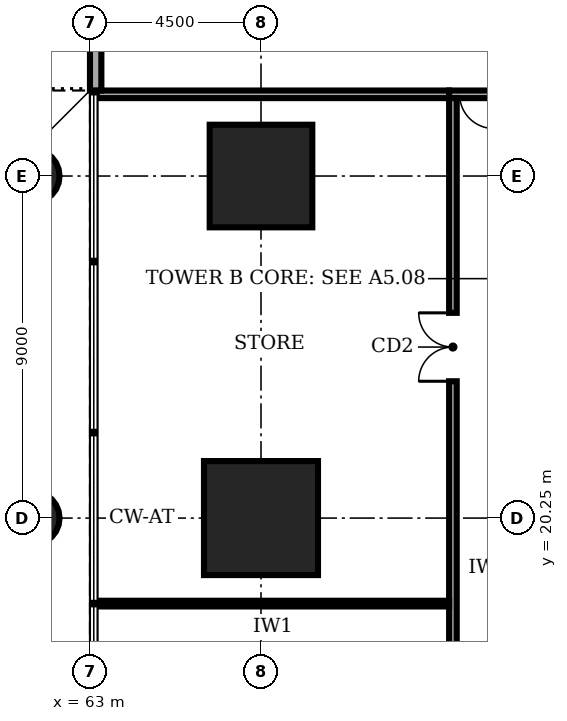
"""IFC4 building model, lengths in metres.
Left out: names, types, materials, properties, quantities, classifications, styles, units other than length and angle.
Written with IfcOpenShell. Run it as: python <this file> out.ifc"""

import sys

from ifc_helpers import new_model, si_unit, direction, frame, frame_2d, origin, origin_2d, place, context, subcontext, project, spatial, rectangle, circle, extrude, element, fill, save


model = new_model("IFC4")
c1 = context("Model", 3, precision=1e-05, world=origin(), true_north=direction((0.0, 1.0)))
c2 = subcontext(c1, "Body", "Model", "MODEL_VIEW")
j1 = project(units=[si_unit("LENGTHUNIT", "METRE"), si_unit("PLANEANGLEUNIT", "RADIAN")], contexts=[c1])
p1 = place(None, origin())
s1 = spatial("IfcSite", under=j1, at=p1, CompositionType="ELEMENT")
p2 = place(p1, origin())
s2 = spatial("IfcBuilding", under=s1, at=p2, CompositionType="ELEMENT")
p3 = place(p2, frame((0.0, 0.0, 16.0)))
s3 = spatial("IfcBuildingStorey", under=s2, at=p3, CompositionType="ELEMENT", Elevation=16.0)
p4 = place(p3, frame((67.5, 20.25, 0.0), z_axis=(0.0, 0.0, 1.0), x_axis=(1.0, 0.0, 0.0)))
e1 = element("IfcColumn", 1, at=p4, inside=s3, PredefinedType="COLUMN", context=c2, shape_type="SweptSolid", body=[
    extrude(rectangle(XDim=3.0, YDim=3.0, at=origin_2d()), origin(), (0.0, 0.0, 1.0), 5.0),
])
p5 = place(p3, frame((67.5, 29.25, 0.0), z_axis=(0.0, 0.0, 1.0), x_axis=(1.0, 0.0, 0.0)))
e2 = element("IfcColumn", 2, at=p5, inside=s3, PredefinedType="COLUMN", context=c2, shape_type="SweptSolid", body=[
    extrude(rectangle(XDim=2.7, YDim=2.7, at=origin_2d()), origin(), (0.0, 0.0, 1.0), 5.0),
])
for number, where, z_axis, x_axis in (
    (3, (61.5, 20.25, 0.0), (0.0, 0.0, 1.0), (1.0, 0.0, 0.0)),
    (4, (61.5, 29.25, 0.0), (0.0, 0.0, 1.0), (1.0, 0.0, 0.0)),
):
    element("IfcColumn", number, at=place(p3, frame(where, z_axis=z_axis, x_axis=x_axis)), inside=s3, PredefinedType="COLUMN", context=c2, shape_type="SweptSolid", body=[
        extrude(circle(Radius=0.7, at=origin_2d()), origin(), (0.0, 0.0, 1.0), 5.0),
    ])
p6 = place(p3, frame((89.35, 31.4, 0.0), z_axis=(0.0, 0.0, 1.0), x_axis=(-1.0, 0.0, 0.0)))
e5 = element("IfcWall", 5, at=p6, inside=s3, PredefinedType="SOLIDWALL", context=c2, shape_type="SweptSolid", body=[
    extrude(rectangle(XDim=16.9, YDim=0.2, at=frame_2d((8.45, 0.0))), origin(), (0.0, 0.0, 1.0), 4.7),
])
p7 = place(p6, frame((13.925, 0.0, 0.0)))
e6 = element("IfcOpeningElement", 6, at=p7, cuts=e5, PredefinedType="OPENING", context=c2, shape_type="SweptSolid", body=[
    extrude(rectangle(XDim=1.8, YDim=2.1, at=frame_2d((0.9, 1.05))), frame((0.0, 0.11, 0.0), z_axis=(0.0, -1.0, 0.0), x_axis=(1.0, 0.0, 0.0)), (0.0, 0.0, 1.0), 0.22),
])
p8 = place(p6, frame((9.4, 0.0, 0.0)))
e7 = element("IfcOpeningElement", 7, at=p8, cuts=e5, PredefinedType="OPENING", context=c2, shape_type="SweptSolid", body=[
    extrude(rectangle(XDim=2.4, YDim=2.7, at=frame_2d((1.2, 1.35))), frame((0.0, 0.11, 0.0), z_axis=(0.0, -1.0, 0.0), x_axis=(1.0, 0.0, 0.0)), (0.0, 0.0, 1.0), 0.22),
])
p9 = place(p6, frame((0.925, 0.0, 0.0)))
e8 = element("IfcOpeningElement", 8, at=p9, cuts=e5, PredefinedType="OPENING", context=c2, shape_type="SweptSolid", body=[
    extrude(rectangle(XDim=1.8, YDim=2.1, at=frame_2d((0.9, 1.05))), frame((0.0, 0.11, 0.0), z_axis=(0.0, -1.0, 0.0), x_axis=(1.0, 0.0, 0.0)), (0.0, 0.0, 1.0), 0.22),
])
p10 = place(p6, frame((5.6, 0.0, 0.0)))
e9 = element("IfcOpeningElement", 9, at=p10, cuts=e5, PredefinedType="OPENING", context=c2, shape_type="SweptSolid", body=[
    extrude(rectangle(XDim=1.0, YDim=2.1, at=frame_2d((0.5, 1.05))), frame((0.0, 0.11, 0.0), z_axis=(0.0, -1.0, 0.0), x_axis=(1.0, 0.0, 0.0)), (0.0, 0.0, 1.0), 0.22),
])
p11 = place(p3, frame((72.55, 31.3, 0.0), z_axis=(0.0, 0.0, 1.0), x_axis=(0.0, -1.0, 0.0)))
e10 = element("IfcWall", 10, at=p11, inside=s3, PredefinedType="SOLIDWALL", context=c2, shape_type="SweptSolid", body=[
    extrude(rectangle(XDim=22.3, YDim=0.2, at=frame_2d((11.15, 0.0))), origin(), (0.0, 0.0, 1.0), 4.7),
])
p12 = place(p11, frame((17.3, 0.0, 0.0)))
e11 = element("IfcOpeningElement", 11, at=p12, cuts=e10, PredefinedType="OPENING", context=c2, shape_type="SweptSolid", body=[
    extrude(rectangle(XDim=1.0, YDim=2.1, at=frame_2d((0.5, 1.05))), frame((0.0, 0.11, 0.0), z_axis=(0.0, -1.0, 0.0), x_axis=(1.0, 0.0, 0.0)), (0.0, 0.0, 1.0), 0.22),
])
p13 = place(p11, frame((5.65, 0.0, 0.0)))
e12 = element("IfcOpeningElement", 12, at=p13, cuts=e10, PredefinedType="OPENING", context=c2, shape_type="SweptSolid", body=[
    extrude(rectangle(XDim=1.8, YDim=2.1, at=frame_2d((0.9, 1.05))), frame((0.0, 0.11, 0.0), z_axis=(0.0, -1.0, 0.0), x_axis=(1.0, 0.0, 0.0)), (0.0, 0.0, 1.0), 0.22),
])
p14 = place(p3, frame((63.18, 31.4, 0.0), z_axis=(0.0, 0.0, 1.0), x_axis=(1.0, 0.0, 0.0)))
e13 = element("IfcWall", 13, at=p14, inside=s3, PredefinedType="SOLIDWALL", context=c2, shape_type="SweptSolid", body=[
    extrude(rectangle(XDim=9.27, YDim=0.2, at=frame_2d((4.635, 0.0))), origin(), (0.0, 0.0, 1.0), 4.7),
])
p15 = place(p3, frame((63.18, 18.0, 0.0), z_axis=(0.0, 0.0, 1.0), x_axis=(1.0, 0.0, 0.0)))
e14 = element("IfcWall", 14, at=p15, inside=s3, PredefinedType="PARTITIONING", context=c2, shape_type="SweptSolid", body=[
    extrude(rectangle(XDim=9.27, YDim=0.15, at=frame_2d((4.635, 0.0))), origin(), (0.0, 0.0, 1.0), 4.7),
])
p16 = place(p3, frame((63.15, 31.5, 0.0), z_axis=(0.0, 0.0, 1.0), x_axis=(0.0, 1.0, 0.0)))
e15 = element("IfcWall", 15, at=p16, inside=s3, PredefinedType="SOLIDWALL", context=c2, shape_type="SweptSolid", body=[
    extrude(rectangle(XDim=16.63, YDim=0.3, at=frame_2d((8.315, 0.0))), origin(), (0.0, 0.0, 1.0), 4.7),
])
p17 = place(p16, frame((12.1, 0.0, 0.0)))
e16 = element("IfcOpeningElement", 16, at=p17, cuts=e15, PredefinedType="OPENING", context=c2, shape_type="SweptSolid", body=[
    extrude(rectangle(XDim=1.8, YDim=2.1, at=frame_2d((0.9, 1.05))), frame((0.0, 0.16, 0.0), z_axis=(0.0, -1.0, 0.0), x_axis=(1.0, 0.0, 0.0)), (0.0, 0.0, 1.0), 0.32),
])
p18 = place(p13, frame((1.8, 0.0, 0.0), z_axis=(0.0, 0.0, 1.0), x_axis=(-1.0, 0.0, 0.0)))
e17 = element("IfcDoor", 17, at=p18, inside=s3, OperationType="DOUBLE_DOOR_SINGLE_SWING", PredefinedType="DOOR", context=c2, shape_type="SweptSolid", body=[
    extrude(rectangle(XDim=1.8, YDim=2.1, at=frame_2d((0.9, 1.05))), frame((0.0, 0.025, 0.0), z_axis=(0.0, -1.0, 0.0), x_axis=(1.0, 0.0, 0.0)), (0.0, 0.0, 1.0), 0.05),
])
fill(e12, e17)
save(model, sys.argv[1])
